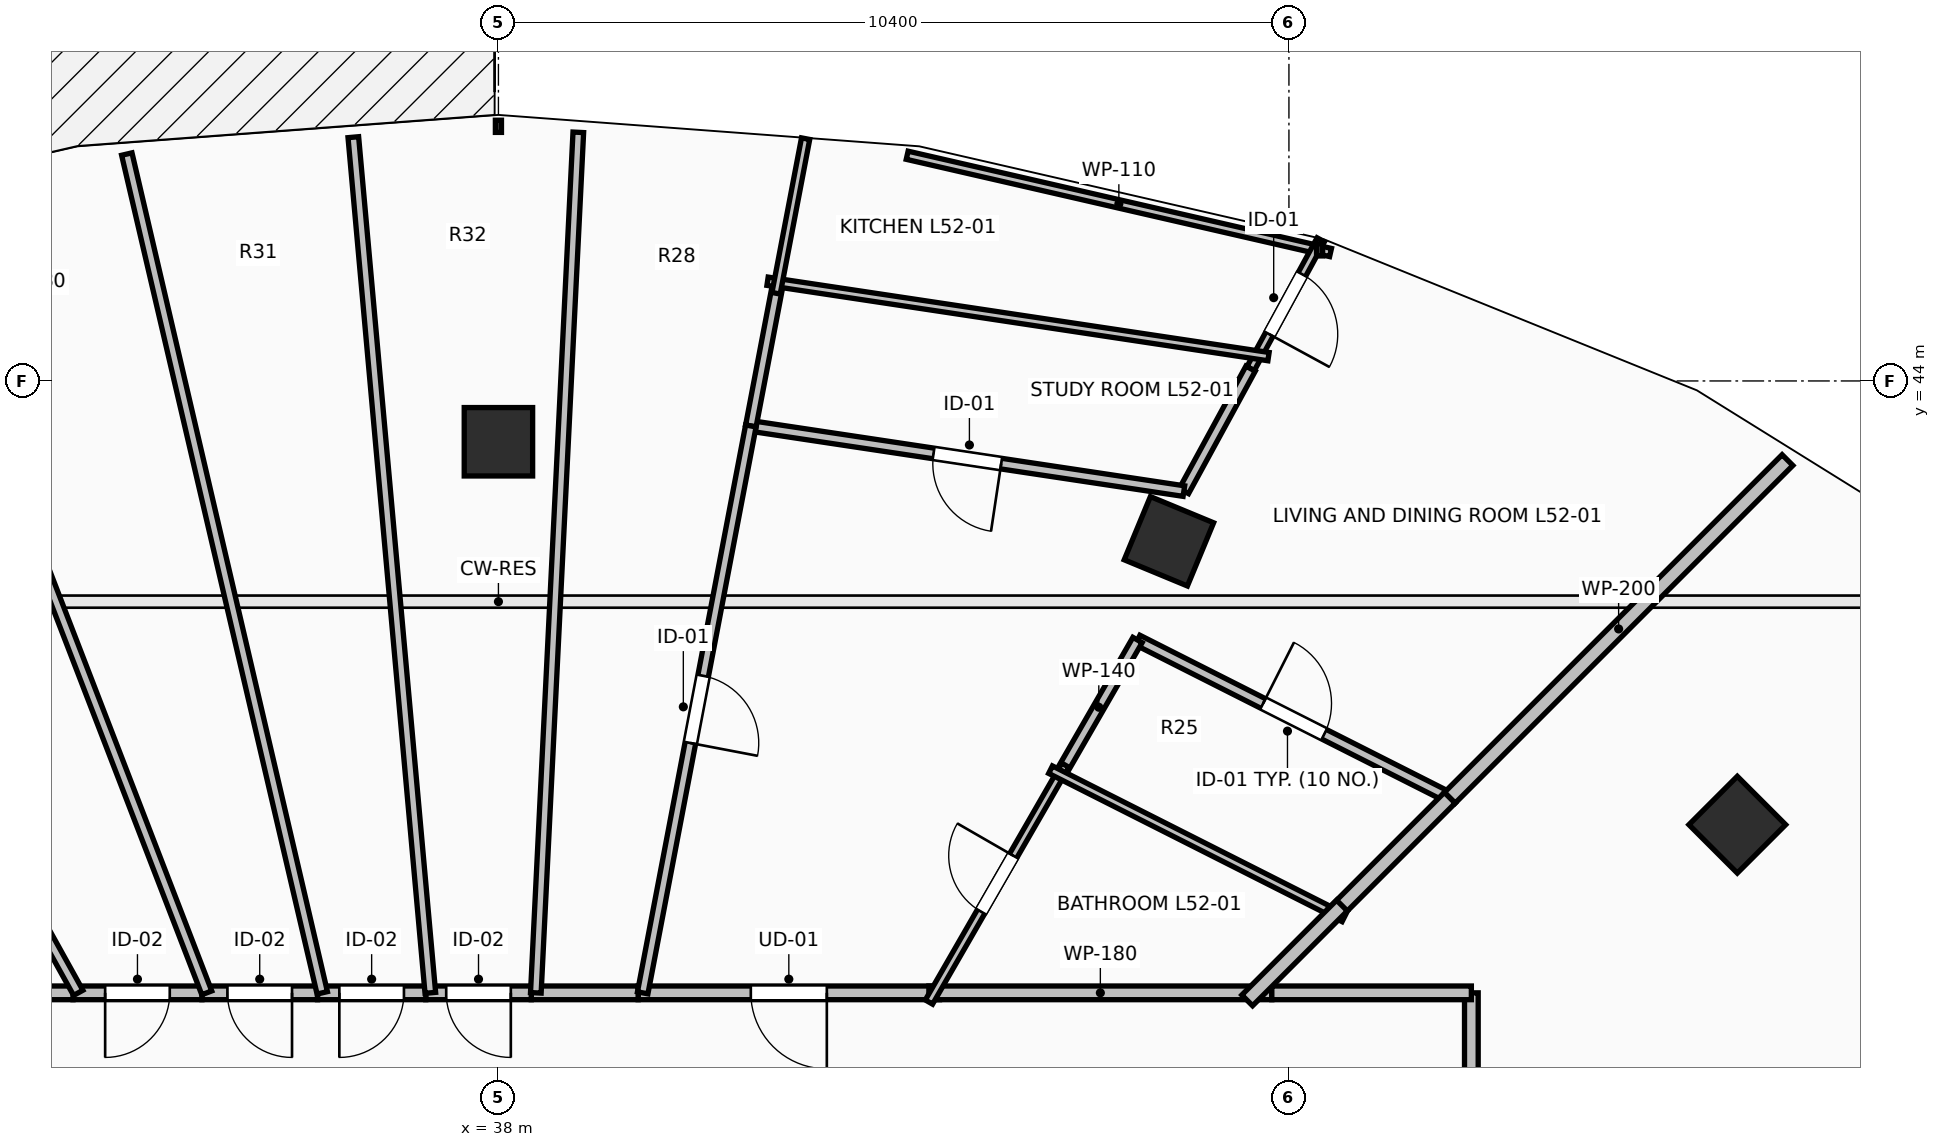
"""IFC4 building model, lengths in metres.
Left out: names, types, materials, properties, quantities, classifications, styles, units other than length and angle.
Written with IfcOpenShell. Run it as: python <this file> out.ifc"""

import sys

from ifc_helpers import new_model, si_unit, direction, frame, frame_2d, origin, origin_2d, place, context, subcontext, project, spatial, rectangle, extrude, element, fill, save


model = new_model("IFC4")
c1 = context("Model", 3, precision=1e-05, world=origin(), true_north=direction((0.0, 1.0)))
c2 = subcontext(c1, "Body", "Model", "MODEL_VIEW")
j1 = project(units=[si_unit("LENGTHUNIT", "METRE"), si_unit("PLANEANGLEUNIT", "RADIAN")], contexts=[c1])
p1 = place(None, origin())
s1 = spatial("IfcSite", under=j1, at=p1, CompositionType="ELEMENT")
p2 = place(p1, origin())
s2 = spatial("IfcBuilding", under=s1, at=p2, CompositionType="ELEMENT")
p3 = place(p2, frame((0.0, 0.0, 193.1)))
s3 = spatial("IfcBuildingStorey", under=s2, at=p3, CompositionType="ELEMENT", Elevation=193.1)
for number, where, z_axis, x_axis in (
    (1, (54.299, 38.162, 0.0), (0.0, 0.0, 1.0), (0.707, 0.707, 0.0)),
    (2, (46.821, 41.891, 0.0), (0.0, 0.0, 1.0), (0.383, 0.924, 0.0)),
    (3, (38.0, 43.2, 0.0), (0.0, 0.0, 1.0), (0.0, 1.0, 0.0)),
):
    element("IfcColumn", number, at=place(p3, frame(where, z_axis=z_axis, x_axis=x_axis)), inside=s3, PredefinedType="COLUMN", context=c2, shape_type="SweptSolid", body=[
        extrude(rectangle(XDim=0.9, YDim=0.9, at=origin_2d()), origin(), (0.0, 0.0, 1.0), 3.5),
    ])
p4 = place(p3, frame((43.803, 35.95, 0.0), z_axis=(0.0, 0.0, 1.0), x_axis=(-1.0, 0.0, 0.0)))
e4 = element("IfcWall", 4, at=p4, inside=s3, PredefinedType="PARTITIONING", context=c2, shape_type="SweptSolid", body=[
    extrude(rectangle(XDim=3.965, YDim=0.18, at=frame_2d((1.982, 0.0))), origin(), (0.0, 0.0, 1.0), 3.24),
])
p5 = place(p4, frame((1.482, 0.0, 0.0)))
e5 = element("IfcOpeningElement", 5, at=p5, cuts=e4, PredefinedType="OPENING", context=c2, shape_type="SweptSolid", body=[
    extrude(rectangle(XDim=1.0, YDim=2.15, at=frame_2d((0.5, 1.075))), frame((0.0, 0.105, 0.0), z_axis=(0.0, -1.0, 0.0), x_axis=(1.0, 0.0, 0.0)), (0.0, 0.0, 1.0), 0.21),
])
p6 = place(p3, frame((48.175, 35.95, 0.0), z_axis=(0.0, 0.0, 1.0), x_axis=(-1.0, 0.0, 0.0)))
e6 = element("IfcWall", 6, at=p6, inside=s3, PredefinedType="PARTITIONING", context=c2, shape_type="SweptSolid", body=[
    extrude(rectangle(XDim=4.512, YDim=0.18, at=frame_2d((2.256, 0.0))), origin(), (0.0, 0.0, 1.0), 2.432),
])
p7 = place(p3, frame((39.838, 35.95, 0.0), z_axis=(0.0, 0.0, 1.0), x_axis=(-1.0, 0.0, 0.0)))
e7 = element("IfcWall", 7, at=p7, inside=s3, PredefinedType="PARTITIONING", context=c2, shape_type="SweptSolid", body=[
    extrude(rectangle(XDim=1.406, YDim=0.18, at=frame_2d((0.703, 0.0))), origin(), (0.0, 0.0, 1.0), 3.24),
])
p8 = place(p3, frame((38.432, 35.95, 0.0), z_axis=(0.0, 0.0, 1.0), x_axis=(-1.0, 0.0, 0.0)))
e8 = element("IfcWall", 8, at=p8, inside=s3, PredefinedType="PARTITIONING", context=c2, shape_type="SweptSolid", body=[
    extrude(rectangle(XDim=1.388, YDim=0.18, at=frame_2d((0.694, 0.0))), origin(), (0.0, 0.0, 1.0), 3.24),
])
p9 = place(p8, frame((0.269, 0.0, 0.0)))
e9 = element("IfcOpeningElement", 9, at=p9, cuts=e8, PredefinedType="OPENING", context=c2, shape_type="SweptSolid", body=[
    extrude(rectangle(XDim=0.85, YDim=2.1, at=frame_2d((0.425, 1.05))), frame((0.0, 0.105, 0.0), z_axis=(0.0, -1.0, 0.0), x_axis=(1.0, 0.0, 0.0)), (0.0, 0.0, 1.0), 0.21),
])
p10 = place(p3, frame((37.044, 35.95, 0.0), z_axis=(0.0, 0.0, 1.0), x_axis=(-1.0, 0.0, 0.0)))
e10 = element("IfcWall", 10, at=p10, inside=s3, PredefinedType="PARTITIONING", context=c2, shape_type="SweptSolid", body=[
    extrude(rectangle(XDim=1.424, YDim=0.18, at=frame_2d((0.712, 0.0))), origin(), (0.0, 0.0, 1.0), 3.24),
])
p11 = place(p10, frame((0.287, 0.0, 0.0)))
e11 = element("IfcOpeningElement", 11, at=p11, cuts=e10, PredefinedType="OPENING", context=c2, shape_type="SweptSolid", body=[
    extrude(rectangle(XDim=0.85, YDim=2.1, at=frame_2d((0.425, 1.05))), frame((0.0, 0.105, 0.0), z_axis=(0.0, -1.0, 0.0), x_axis=(1.0, 0.0, 0.0)), (0.0, 0.0, 1.0), 0.21),
])
p12 = place(p3, frame((35.62, 35.95, 0.0), z_axis=(0.0, 0.0, 1.0), x_axis=(-1.0, 0.0, 0.0)))
e12 = element("IfcWall", 12, at=p12, inside=s3, PredefinedType="PARTITIONING", context=c2, shape_type="SweptSolid", body=[
    extrude(rectangle(XDim=1.521, YDim=0.18, at=frame_2d((0.76, 0.0))), origin(), (0.0, 0.0, 1.0), 3.24),
])
p13 = place(p12, frame((0.335, 0.0, 0.0)))
e13 = element("IfcOpeningElement", 13, at=p13, cuts=e12, PredefinedType="OPENING", context=c2, shape_type="SweptSolid", body=[
    extrude(rectangle(XDim=0.85, YDim=2.1, at=frame_2d((0.425, 1.05))), frame((0.0, 0.105, 0.0), z_axis=(0.0, -1.0, 0.0), x_axis=(1.0, 0.0, 0.0)), (0.0, 0.0, 1.0), 0.21),
])
p14 = place(p3, frame((34.099, 35.95, 0.0), z_axis=(0.0, 0.0, 1.0), x_axis=(-1.0, 0.0, 0.0)))
e14 = element("IfcWall", 14, at=p14, inside=s3, PredefinedType="PARTITIONING", context=c2, shape_type="SweptSolid", body=[
    extrude(rectangle(XDim=1.696, YDim=0.18, at=frame_2d((0.848, 0.0))), origin(), (0.0, 0.0, 1.0), 3.24),
])
p15 = place(p14, frame((0.423, 0.0, 0.0)))
e15 = element("IfcOpeningElement", 15, at=p15, cuts=e14, PredefinedType="OPENING", context=c2, shape_type="SweptSolid", body=[
    extrude(rectangle(XDim=0.85, YDim=2.1, at=frame_2d((0.425, 1.05))), frame((0.0, 0.105, 0.0), z_axis=(0.0, -1.0, 0.0), x_axis=(1.0, 0.0, 0.0)), (0.0, 0.0, 1.0), 0.21),
])
p16 = place(p3, frame((32.403, 35.95, 0.0), z_axis=(0.0, 0.0, 1.0), x_axis=(-1.0, 0.0, 0.0)))
e16 = element("IfcWall", 16, at=p16, inside=s3, PredefinedType="PARTITIONING", context=c2, shape_type="SweptSolid", body=[
    extrude(rectangle(XDim=1.984, YDim=0.18, at=frame_2d((0.992, 0.0))), origin(), (0.0, 0.0, 1.0), 2.432),
])
p17 = place(p16, frame((0.567, 0.0, 0.0)))
e17 = element("IfcOpeningElement", 17, at=p17, cuts=e16, PredefinedType="OPENING", context=c2, shape_type="SweptSolid", body=[
    extrude(rectangle(XDim=0.85, YDim=2.1, at=frame_2d((0.425, 1.05))), frame((0.0, 0.105, 0.0), z_axis=(0.0, -1.0, 0.0), x_axis=(1.0, 0.0, 0.0)), (0.0, 0.0, 1.0), 0.21),
])
p18 = place(p3, frame((50.8, 27.25, 0.0), z_axis=(0.0, 0.0, 1.0), x_axis=(0.0, 1.0, 0.0)))
e18 = element("IfcWall", 18, at=p18, inside=s3, PredefinedType="PARTITIONING", context=c2, shape_type="SweptSolid", body=[
    extrude(rectangle(XDim=8.7, YDim=0.18, at=frame_2d((4.35, 0.0))), origin(), (0.0, 0.0, 1.0), 2.432),
])
p19 = place(p3, frame((50.8, 35.95, 0.0), z_axis=(0.0, 0.0, 1.0), x_axis=(-1.0, 0.0, 0.0)))
e19 = element("IfcWall", 19, at=p19, inside=s3, PredefinedType="PARTITIONING", context=c2, shape_type="SweptSolid", body=[
    extrude(rectangle(XDim=2.625, YDim=0.18, at=frame_2d((1.312, 0.0))), origin(), (0.0, 0.0, 1.0), 2.432),
])
p20 = place(p3, frame((46.408, 40.592, 0.0), z_axis=(0.0, 0.0, 1.0), x_axis=(0.89252026196, -0.451007297049, 0.0)))
e20 = element("IfcWall", 20, at=p20, inside=s3, PredefinedType="PARTITIONING", context=c2, shape_type="SweptSolid", body=[
    extrude(rectangle(XDim=4.603, YDim=0.14, at=frame_2d((2.301, 0.0))), origin(), (0.0, 0.0, 1.0), 2.432),
])
p21 = place(p20, frame((1.851, 0.0, 0.0)))
e21 = element("IfcOpeningElement", 21, at=p21, cuts=e20, PredefinedType="OPENING", context=c2, shape_type="SweptSolid", body=[
    extrude(rectangle(XDim=0.9, YDim=2.1, at=frame_2d((0.45, 1.05))), frame((0.0, 0.085, 0.0), z_axis=(0.0, -1.0, 0.0), x_axis=(1.0, 0.0, 0.0)), (0.0, 0.0, 1.0), 0.17),
])
p22 = place(p3, frame((45.389, 38.823, 0.0), z_axis=(0.0, 0.0, 1.0), x_axis=(0.499149502221, 0.866515882389, 0.0)))
e22 = element("IfcWall", 22, at=p22, inside=s3, PredefinedType="PARTITIONING", context=c2, shape_type="SweptSolid", body=[
    extrude(rectangle(XDim=2.042, YDim=0.14, at=frame_2d((1.021, 0.0))), origin(), (0.0, 0.0, 1.0), 2.922),
])
p23 = place(p3, frame((43.664, 35.829, 0.0), z_axis=(0.0, 0.0, 1.0), x_axis=(0.49917767271, 0.866499654396, 0.0)))
e23 = element("IfcWall", 23, at=p23, inside=s3, PredefinedType="PARTITIONING", context=c2, shape_type="SweptSolid", body=[
    extrude(rectangle(XDim=3.596, YDim=0.11, at=frame_2d((1.798, 0.0))), origin(), (0.0, 0.0, 1.0), 2.972),
])
p24 = place(p23, frame((1.373, 0.0, 0.0)))
e24 = element("IfcOpeningElement", 24, at=p24, cuts=e23, PredefinedType="OPENING", context=c2, shape_type="SweptSolid", body=[
    extrude(rectangle(XDim=0.85, YDim=2.1, at=frame_2d((0.425, 1.05))), frame((0.0, 0.07, 0.0), z_axis=(0.0, -1.0, 0.0), x_axis=(1.0, 0.0, 0.0)), (0.0, 0.0, 1.0), 0.14),
])
p25 = place(p3, frame((48.948, 45.69, 0.0), z_axis=(0.0, 0.0, 1.0), x_axis=(-0.974613198555, 0.223895317508, 0.0)))
e25 = element("IfcWall", 25, at=p25, inside=s3, PredefinedType="PARTITIONING", context=c2, shape_type="SweptSolid", body=[
    extrude(rectangle(XDim=5.715, YDim=0.11, at=frame_2d((2.857, 0.0))), origin(), (0.0, 0.0, 1.0), 3.24),
])
p26 = place(p3, frame((48.819, 45.857, 0.0), z_axis=(0.0, 0.0, 1.0), x_axis=(-0.478311376557, -0.878190313689, 0.0)))
e26 = element("IfcWall", 26, at=p26, inside=s3, PredefinedType="PARTITIONING", context=c2, shape_type="SweptSolid", body=[
    extrude(rectangle(XDim=1.93, YDim=0.11, at=frame_2d((0.965, 0.0))), origin(), (0.0, 0.0, 1.0), 3.24),
])
p27 = place(p26, frame((0.515, 0.0, 0.0)))
e27 = element("IfcOpeningElement", 27, at=p27, cuts=e26, PredefinedType="OPENING", context=c2, shape_type="SweptSolid", body=[
    extrude(rectangle(XDim=0.9, YDim=2.1, at=frame_2d((0.45, 1.05))), frame((0.0, 0.07, 0.0), z_axis=(0.0, -1.0, 0.0), x_axis=(1.0, 0.0, 0.0)), (0.0, 0.0, 1.0), 0.14),
])
p28 = place(p3, frame((47.896, 44.162, 0.0), z_axis=(0.0, 0.0, 1.0), x_axis=(-0.47839521225, -0.87814464691, 0.0)))
e28 = element("IfcWall", 28, at=p28, inside=s3, PredefinedType="PARTITIONING", context=c2, shape_type="SweptSolid", body=[
    extrude(rectangle(XDim=1.835, YDim=0.14, at=frame_2d((0.917, 0.0))), origin(), (0.0, 0.0, 1.0), 3.24),
])
p29 = place(p3, frame((47.018, 42.551, 0.0), z_axis=(0.0, 0.0, 1.0), x_axis=(-0.98887565722, 0.148744527827, 0.0)))
e29 = element("IfcWall", 29, at=p29, inside=s3, PredefinedType="PARTITIONING", context=c2, shape_type="SweptSolid", body=[
    extrude(rectangle(XDim=5.761, YDim=0.14, at=frame_2d((2.881, 0.0))), origin(), (0.0, 0.0, 1.0), 3.24),
])
p30 = place(p29, frame((2.43, 0.0, 0.0)))
e30 = element("IfcOpeningElement", 30, at=p30, cuts=e29, PredefinedType="OPENING", context=c2, shape_type="SweptSolid", body=[
    extrude(rectangle(XDim=0.9, YDim=2.1, at=frame_2d((0.45, 1.05))), frame((0.0, 0.085, 0.0), z_axis=(0.0, -1.0, 0.0), x_axis=(1.0, 0.0, 0.0)), (0.0, 0.0, 1.0), 0.17),
])
p31 = place(p3, frame((41.321, 43.408, 0.0), z_axis=(0.0, 0.0, 1.0), x_axis=(0.187217449549, 0.982318495491, 0.0)))
e31 = element("IfcWall", 31, at=p31, inside=s3, PredefinedType="PARTITIONING", context=c2, shape_type="SweptSolid", body=[
    extrude(rectangle(XDim=1.917, YDim=0.14, at=frame_2d((0.958, 0.0))), origin(), (0.0, 0.0, 1.0), 3.24),
])
p32 = place(p3, frame((41.321, 43.408, 0.0), z_axis=(0.0, 0.0, 1.0), x_axis=(-0.187401709503, -0.982283359971, 0.0)))
e32 = element("IfcWall", 32, at=p32, inside=s3, PredefinedType="PARTITIONING", context=c2, shape_type="SweptSolid", body=[
    extrude(rectangle(XDim=7.593, YDim=0.14, at=frame_2d((3.796, 0.0))), origin(), (0.0, 0.0, 1.0), 2.774),
])
p33 = place(p32, frame((3.346, 0.0, 0.0)))
e33 = element("IfcOpeningElement", 33, at=p33, cuts=e32, PredefinedType="OPENING", context=c2, shape_type="SweptSolid", body=[
    extrude(rectangle(XDim=0.9, YDim=2.1, at=frame_2d((0.45, 1.05))), frame((0.0, 0.085, 0.0), z_axis=(0.0, -1.0, 0.0), x_axis=(1.0, 0.0, 0.0)), (0.0, 0.0, 1.0), 0.17),
])
p34 = place(p3, frame((50.516, 38.516, 0.0), z_axis=(0.0, 0.0, 1.0), x_axis=(0.707106781187, 0.707106781187, 0.0)))
e34 = element("IfcWall", 34, at=p34, inside=s3, PredefinedType="PARTITIONING", context=c2, shape_type="SweptSolid", body=[
    extrude(rectangle(XDim=6.283, YDim=0.2, at=frame_2d((3.142, 0.0))), origin(), (0.0, 0.0, 1.0), 2.774),
])
p35 = place(p3, frame((45.264, 38.886, 0.0), z_axis=(0.0, 0.0, 1.0), x_axis=(0.892556527512, -0.450935522216, 0.0)))
e35 = element("IfcWall", 35, at=p35, inside=s3, PredefinedType="PARTITIONING", context=c2, shape_type="SweptSolid", body=[
    extrude(rectangle(XDim=4.325, YDim=0.11, at=frame_2d((2.162, 0.0))), origin(), (0.0, 0.0, 1.0), 2.432),
])
p36 = place(p3, frame((48.999, 36.999, 0.0), z_axis=(0.0, 0.0, 1.0), x_axis=(0.707106781187, 0.707106781187, 0.0)))
e36 = element("IfcWall", 36, at=p36, inside=s3, PredefinedType="PARTITIONING", context=c2, shape_type="SweptSolid", body=[
    extrude(rectangle(XDim=2.146, YDim=0.2, at=frame_2d((1.073, 0.0))), origin(), (0.0, 0.0, 1.0), 2.922),
])
p37 = place(p3, frame((47.851, 35.851, 0.0), z_axis=(0.0, 0.0, 1.0), x_axis=(0.707106781187, 0.707106781187, 0.0)))
e37 = element("IfcWall", 37, at=p37, inside=s3, PredefinedType="PARTITIONING", context=c2, shape_type="SweptSolid", body=[
    extrude(rectangle(XDim=1.763, YDim=0.2, at=frame_2d((0.882, 0.0))), origin(), (0.0, 0.0, 1.0), 2.432),
])
p38 = place(p3, frame((41.541, 45.312, 0.0), z_axis=(0.0, 0.0, 1.0), x_axis=(0.988873931206, -0.148756002172, 0.0)))
e38 = element("IfcWall", 38, at=p38, inside=s3, PredefinedType="PARTITIONING", context=c2, shape_type="SweptSolid", body=[
    extrude(rectangle(XDim=6.665, YDim=0.11, at=frame_2d((3.333, 0.0))), origin(), (0.0, 0.0, 1.0), 3.24),
])
p39 = place(p3, frame((42.041, 47.188, 0.0), z_axis=(0.0, 0.0, 1.0), x_axis=(-0.187605166264, -0.982244522301, 0.0)))
e39 = element("IfcWall", 39, at=p39, inside=s3, PredefinedType="PARTITIONING", context=c2, shape_type="SweptSolid", body=[
    extrude(rectangle(XDim=2.071, YDim=0.11, at=frame_2d((1.035, 0.0))), origin(), (0.0, 0.0, 1.0), 3.24),
])
p40 = place(p3, frame((39.051, 47.271, 0.0), z_axis=(0.0, 0.0, 1.0), x_axis=(-0.049324203907, -0.998782820692, 0.0)))
e40 = element("IfcWall", 40, at=p40, inside=s3, PredefinedType="PARTITIONING", context=c2, shape_type="SweptSolid", body=[
    extrude(rectangle(XDim=11.335, YDim=0.14, at=frame_2d((5.667, 0.0))), origin(), (0.0, 0.0, 1.0), 2.774),
])
p41 = place(p3, frame((36.091, 47.207, 0.0), z_axis=(0.0, 0.0, 1.0), x_axis=(0.089620343685, -0.995976000714, 0.0)))
e41 = element("IfcWall", 41, at=p41, inside=s3, PredefinedType="PARTITIONING", context=c2, shape_type="SweptSolid", body=[
    extrude(rectangle(XDim=11.302, YDim=0.14, at=frame_2d((5.651, 0.0))), origin(), (0.0, 0.0, 1.0), 2.432),
])
p42 = place(p3, frame((33.111, 46.985, 0.0), z_axis=(0.0, 0.0, 1.0), x_axis=(0.226889028745, -0.973920617214, 0.0)))
e42 = element("IfcWall", 42, at=p42, inside=s3, PredefinedType="PARTITIONING", context=c2, shape_type="SweptSolid", body=[
    extrude(rectangle(XDim=11.331, YDim=0.14, at=frame_2d((5.665, 0.0))), origin(), (0.0, 0.0, 1.0), 2.432),
])
p43 = place(p3, frame((30.135, 46.398, 0.0), z_axis=(0.0, 0.0, 1.0), x_axis=(0.359727007777, -0.933057597298, 0.0)))
e43 = element("IfcWall", 43, at=p43, inside=s3, PredefinedType="PARTITIONING", context=c2, shape_type="SweptSolid", body=[
    extrude(rectangle(XDim=11.198, YDim=0.14, at=frame_2d((5.599, 0.0))), origin(), (0.0, 0.0, 1.0), 2.432),
])
p44 = place(p3, frame((27.069, 45.673, 0.0), z_axis=(0.0, 0.0, 1.0), x_axis=(0.485717471054, -0.874115860921, 0.0)))
e44 = element("IfcWall", 44, at=p44, inside=s3, PredefinedType="PARTITIONING", context=c2, shape_type="SweptSolid", body=[
    extrude(rectangle(XDim=11.123, YDim=0.14, at=frame_2d((5.562, 0.0))), origin(), (0.0, 0.0, 1.0), 2.432),
])
p45 = place(p5, origin())
e45 = element("IfcDoor", 45, at=p45, inside=s3, OperationType="SINGLE_SWING_LEFT", PredefinedType="DOOR", context=c2, shape_type="SweptSolid", body=[
    extrude(rectangle(XDim=1.0, YDim=2.15, at=frame_2d((0.5, 1.075))), frame((0.0, 0.025, 0.0), z_axis=(0.0, -1.0, 0.0), x_axis=(1.0, 0.0, 0.0)), (0.0, 0.0, 1.0), 0.05),
])
fill(e5, e45)
p46 = place(p21, origin())
e46 = element("IfcDoor", 46, at=p46, inside=s3, OperationType="SINGLE_SWING_LEFT", PredefinedType="DOOR", context=c2, shape_type="SweptSolid", body=[
    extrude(rectangle(XDim=0.9, YDim=2.1, at=frame_2d((0.45, 1.05))), frame((0.0, 0.025, 0.0), z_axis=(0.0, -1.0, 0.0), x_axis=(1.0, 0.0, 0.0)), (0.0, 0.0, 1.0), 0.05),
])
fill(e21, e46)
p47 = place(p24, origin())
e47 = element("IfcDoor", 47, at=p47, inside=s3, OperationType="SINGLE_SWING_RIGHT", PredefinedType="DOOR", context=c2, shape_type="SweptSolid", body=[
    extrude(rectangle(XDim=0.85, YDim=2.1, at=frame_2d((0.425, 1.05))), frame((0.0, 0.025, 0.0), z_axis=(0.0, -1.0, 0.0), x_axis=(1.0, 0.0, 0.0)), (0.0, 0.0, 1.0), 0.05),
])
fill(e24, e47)
p48 = place(p27, origin())
e48 = element("IfcDoor", 48, at=p48, inside=s3, OperationType="SINGLE_SWING_RIGHT", PredefinedType="DOOR", context=c2, shape_type="SweptSolid", body=[
    extrude(rectangle(XDim=0.9, YDim=2.1, at=frame_2d((0.45, 1.05))), frame((0.0, 0.025, 0.0), z_axis=(0.0, -1.0, 0.0), x_axis=(1.0, 0.0, 0.0)), (0.0, 0.0, 1.0), 0.05),
])
fill(e27, e48)
p49 = place(p30, origin())
e49 = element("IfcDoor", 49, at=p49, inside=s3, OperationType="SINGLE_SWING_LEFT", PredefinedType="DOOR", context=c2, shape_type="SweptSolid", body=[
    extrude(rectangle(XDim=0.9, YDim=2.1, at=frame_2d((0.45, 1.05))), frame((0.0, 0.025, 0.0), z_axis=(0.0, -1.0, 0.0), x_axis=(1.0, 0.0, 0.0)), (0.0, 0.0, 1.0), 0.05),
])
fill(e30, e49)
p50 = place(p33, origin())
e50 = element("IfcDoor", 50, at=p50, inside=s3, OperationType="SINGLE_SWING_RIGHT", PredefinedType="DOOR", context=c2, shape_type="SweptSolid", body=[
    extrude(rectangle(XDim=0.9, YDim=2.1, at=frame_2d((0.45, 1.05))), frame((0.0, 0.025, 0.0), z_axis=(0.0, -1.0, 0.0), x_axis=(1.0, 0.0, 0.0)), (0.0, 0.0, 1.0), 0.05),
])
fill(e33, e50)
p51 = place(p9, origin())
e51 = element("IfcDoor", 51, at=p51, inside=s3, OperationType="SINGLE_SWING_LEFT", PredefinedType="DOOR", context=c2, shape_type="SweptSolid", body=[
    extrude(rectangle(XDim=0.85, YDim=2.1, at=frame_2d((0.425, 1.05))), frame((0.0, 0.025, 0.0), z_axis=(0.0, -1.0, 0.0), x_axis=(1.0, 0.0, 0.0)), (0.0, 0.0, 1.0), 0.05),
])
fill(e9, e51)
p52 = place(p11, origin())
e52 = element("IfcDoor", 52, at=p52, inside=s3, OperationType="SINGLE_SWING_RIGHT", PredefinedType="DOOR", context=c2, shape_type="SweptSolid", body=[
    extrude(rectangle(XDim=0.85, YDim=2.1, at=frame_2d((0.425, 1.05))), frame((0.0, 0.025, 0.0), z_axis=(0.0, -1.0, 0.0), x_axis=(1.0, 0.0, 0.0)), (0.0, 0.0, 1.0), 0.05),
])
fill(e11, e52)
p53 = place(p13, origin())
e53 = element("IfcDoor", 53, at=p53, inside=s3, OperationType="SINGLE_SWING_LEFT", PredefinedType="DOOR", context=c2, shape_type="SweptSolid", body=[
    extrude(rectangle(XDim=0.85, YDim=2.1, at=frame_2d((0.425, 1.05))), frame((0.0, 0.025, 0.0), z_axis=(0.0, -1.0, 0.0), x_axis=(1.0, 0.0, 0.0)), (0.0, 0.0, 1.0), 0.05),
])
fill(e13, e53)
p54 = place(p15, origin())
e54 = element("IfcDoor", 54, at=p54, inside=s3, OperationType="SINGLE_SWING_RIGHT", PredefinedType="DOOR", context=c2, shape_type="SweptSolid", body=[
    extrude(rectangle(XDim=0.85, YDim=2.1, at=frame_2d((0.425, 1.05))), frame((0.0, 0.025, 0.0), z_axis=(0.0, -1.0, 0.0), x_axis=(1.0, 0.0, 0.0)), (0.0, 0.0, 1.0), 0.05),
])
fill(e15, e54)
save(model, sys.argv[1])
